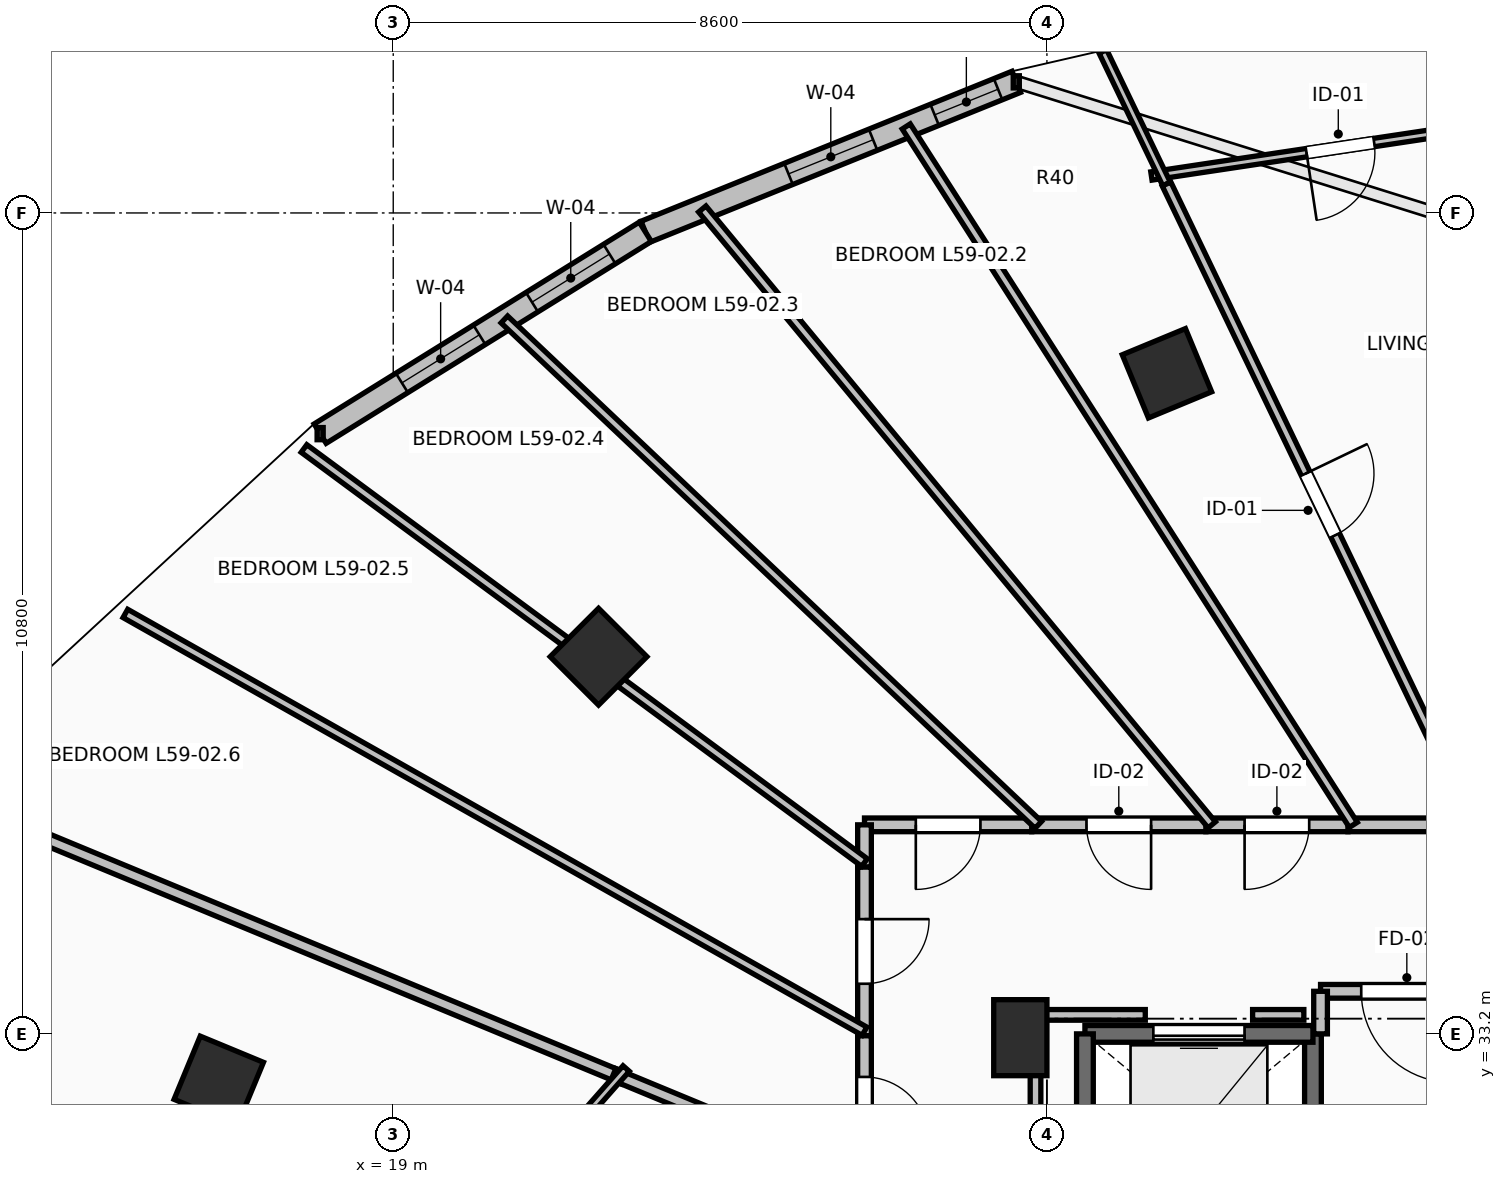
"""IFC4 building model, lengths in metres.
Left out: names, types, materials, properties, quantities, classifications, styles, units other than length and angle.
Written with IfcOpenShell. Run it as: python <this file> out.ifc"""

import sys

from ifc_helpers import new_model, si_unit, direction, frame, frame_2d, origin, origin_2d, place, context, subcontext, project, spatial, rectangle, extrude, element, fill, save


model = new_model("IFC4")
c1 = context("Model", 3, precision=1e-05, world=origin(), true_north=direction((0.0, 1.0)))
c2 = subcontext(c1, "Body", "Model", "MODEL_VIEW")
j1 = project(units=[si_unit("LENGTHUNIT", "METRE"), si_unit("PLANEANGLEUNIT", "RADIAN")], contexts=[c1])
p1 = place(None, origin())
s1 = spatial("IfcSite", under=j1, at=p1, CompositionType="ELEMENT")
p2 = place(p1, origin())
s2 = spatial("IfcBuilding", under=s1, at=p2, CompositionType="ELEMENT")
p3 = place(p2, frame((0.0, 0.0, 217.85)))
s3 = spatial("IfcBuildingStorey", under=s2, at=p3, CompositionType="ELEMENT", Elevation=217.85)
for number, where, z_axis, x_axis in (
    (1, (29.179, 41.891, 0.0), (0.0, 0.0, 1.0), (-0.383, 0.924, 0.0)),
    (2, (21.701, 38.162, 0.0), (0.0, 0.0, 1.0), (-0.707, 0.707, 0.0)),
    (3, (16.705, 32.582, 0.0), (0.0, 0.0, 1.0), (-0.924, 0.383, 0.0)),
):
    element("IfcColumn", number, at=place(p3, frame(where, z_axis=z_axis, x_axis=x_axis)), inside=s3, PredefinedType="COLUMN", context=c2, shape_type="SweptSolid", body=[
        extrude(rectangle(XDim=0.9, YDim=0.9, at=origin_2d()), origin(), (0.0, 0.0, 1.0), 3.55),
    ])
p4 = place(p3, frame((27.25, 33.15, 0.0), z_axis=(0.0, 0.0, 1.0), x_axis=(1.0, 0.0, 0.0)))
e4 = element("IfcColumn", 4, at=p4, inside=s3, PredefinedType="PILASTER", context=c2, shape_type="SweptSolid", body=[
    extrude(rectangle(XDim=0.7, YDim=1.0, at=origin_2d()), origin(), (0.0, 0.0, 1.0), 3.55),
])
p5 = place(p3, frame((27.197, 45.725, 0.0), z_axis=(0.0, 0.0, 1.0), x_axis=(-0.927111094334, -0.374786630981, 0.0)))
e5 = element("IfcWall", 5, at=p5, inside=s3, PredefinedType="STANDARD", context=c2, shape_type="SweptSolid", body=[
    extrude(rectangle(XDim=5.264, YDim=0.3, at=frame_2d((2.632, 0.0))), origin(), (0.0, 0.0, 1.0), 3.29),
])
p6 = place(p5, frame((0.258, 0.0, 0.85)))
e6 = element("IfcOpeningElement", 6, at=p6, cuts=e5, PredefinedType="OPENING", context=c2, shape_type="SweptSolid", body=[
    extrude(rectangle(XDim=0.9, YDim=1.8, at=frame_2d((0.45, 0.9))), frame((0.0, 0.165, 0.0), z_axis=(0.0, -1.0, 0.0), x_axis=(1.0, 0.0, 0.0)), (0.0, 0.0, 1.0), 0.33),
])
p7 = place(p5, frame((2.032, 0.0, 0.85)))
e7 = element("IfcOpeningElement", 7, at=p7, cuts=e5, PredefinedType="OPENING", context=c2, shape_type="SweptSolid", body=[
    extrude(rectangle(XDim=1.2, YDim=1.95, at=frame_2d((0.6, 0.975))), frame((0.0, 0.165, 0.0), z_axis=(0.0, -1.0, 0.0), x_axis=(1.0, 0.0, 0.0)), (0.0, 0.0, 1.0), 0.33),
])
p8 = place(p3, frame((22.316, 43.752, 0.0), z_axis=(0.0, 0.0, 1.0), x_axis=(-0.849647657754, -0.527350791858, 0.0)))
e8 = element("IfcWall", 8, at=p8, inside=s3, PredefinedType="STANDARD", context=c2, shape_type="SweptSolid", body=[
    extrude(rectangle(XDim=5.035, YDim=0.3, at=frame_2d((2.518, 0.0))), origin(), (0.0, 0.0, 1.0), 3.29),
])
p9 = place(p8, frame((0.555, 0.0, 0.85)))
e9 = element("IfcOpeningElement", 9, at=p9, cuts=e8, PredefinedType="OPENING", context=c2, shape_type="SweptSolid", body=[
    extrude(rectangle(XDim=1.2, YDim=1.95, at=frame_2d((0.6, 0.975))), frame((0.0, 0.165, 0.0), z_axis=(0.0, -1.0, 0.0), x_axis=(1.0, 0.0, 0.0)), (0.0, 0.0, 1.0), 0.33),
])
p10 = place(p8, frame((2.569, 0.0, 0.85)))
e10 = element("IfcOpeningElement", 10, at=p10, cuts=e8, PredefinedType="OPENING", context=c2, shape_type="SweptSolid", body=[
    extrude(rectangle(XDim=1.2, YDim=1.95, at=frame_2d((0.6, 0.975))), frame((0.0, 0.165, 0.0), z_axis=(0.0, -1.0, 0.0), x_axis=(1.0, 0.0, 0.0)), (0.0, 0.0, 1.0), 0.33),
])
p11 = place(p3, frame((31.1, 30.7, 0.0), z_axis=(0.0, 0.0, 1.0), x_axis=(0.0, 1.0, 0.0)))
e11 = element("IfcWall", 11, at=p11, inside=s3, PredefinedType="SOLIDWALL", context=c2, shape_type="SweptSolid", body=[
    extrude(rectangle(XDim=2.5, YDim=0.22, at=frame_2d((1.25, 0.0))), origin(), (0.0, 0.0, 1.0), 3.29),
])
p12 = place(p3, frame((31.1, 33.2, 0.0), z_axis=(0.0, 0.0, 1.0), x_axis=(-1.0, 0.0, 0.0)))
e12 = element("IfcWall", 12, at=p12, inside=s3, PredefinedType="SOLIDWALL", context=c2, shape_type="SweptSolid", body=[
    extrude(rectangle(XDim=3.0, YDim=0.22, at=frame_2d((1.5, 0.0))), origin(), (0.0, 0.0, 1.0), 3.29),
])
p13 = place(p12, frame((0.9, 0.0, 0.0)))
e13 = element("IfcOpeningElement", 13, at=p13, cuts=e12, PredefinedType="OPENING", context=c2, shape_type="SweptSolid", body=[
    extrude(rectangle(XDim=1.2, YDim=2.2, at=frame_2d((0.6, 1.1))), frame((0.0, 0.125, 0.0), z_axis=(0.0, -1.0, 0.0), x_axis=(1.0, 0.0, 0.0)), (0.0, 0.0, 1.0), 0.25),
])
p14 = place(p3, frame((28.1, 33.2, 0.0), z_axis=(0.0, 0.0, 1.0), x_axis=(0.0, -1.0, 0.0)))
e14 = element("IfcWall", 14, at=p14, inside=s3, PredefinedType="SOLIDWALL", context=c2, shape_type="SweptSolid", body=[
    extrude(rectangle(XDim=2.5, YDim=0.22, at=frame_2d((1.25, 0.0))), origin(), (0.0, 0.0, 1.0), 3.29),
])
p15 = place(p3, frame((33.47, 33.76, 0.0), z_axis=(0.0, 0.0, 1.0), x_axis=(-1.0, 0.0, 0.0)))
e15 = element("IfcWall", 15, at=p15, inside=s3, PredefinedType="PARTITIONING", context=c2, shape_type="SweptSolid", body=[
    extrude(rectangle(XDim=2.27, YDim=0.18, at=frame_2d((1.135, 0.0))), origin(), (0.0, 0.0, 1.0), 3.29),
])
p16 = place(p15, frame((0.535, 0.0, 0.0)))
e16 = element("IfcOpeningElement", 16, at=p16, cuts=e15, PredefinedType="OPENING", context=c2, shape_type="SweptSolid", body=[
    extrude(rectangle(XDim=1.2, YDim=2.15, at=frame_2d((0.6, 1.075))), frame((0.0, 0.105, 0.0), z_axis=(0.0, -1.0, 0.0), x_axis=(1.0, 0.0, 0.0)), (0.0, 0.0, 1.0), 0.21),
])
p17 = place(p3, frame((31.2, 33.76, 0.0), z_axis=(0.0, 0.0, 1.0), x_axis=(0.0, -1.0, 0.0)))
e17 = element("IfcWall", 17, at=p17, inside=s3, PredefinedType="PARTITIONING", context=c2, shape_type="SweptSolid", body=[
    extrude(rectangle(XDim=0.56, YDim=0.18, at=frame_2d((0.28, 0.0))), origin(), (0.0, 0.0, 1.0), 3.29),
])
p18 = place(p3, frame((33.155, 35.95, 0.0), z_axis=(0.0, 0.0, 1.0), x_axis=(-1.0, 0.0, 0.0)))
e18 = element("IfcWall", 18, at=p18, inside=s3, PredefinedType="PARTITIONING", context=c2, shape_type="SweptSolid", body=[
    extrude(rectangle(XDim=1.595, YDim=0.18, at=frame_2d((0.797, 0.0))), origin(), (0.0, 0.0, 1.0), 3.29),
])
p19 = place(p3, frame((31.56, 35.95, 0.0), z_axis=(0.0, 0.0, 1.0), x_axis=(-1.0, 0.0, 0.0)))
e19 = element("IfcWall", 19, at=p19, inside=s3, PredefinedType="PARTITIONING", context=c2, shape_type="SweptSolid", body=[
    extrude(rectangle(XDim=1.869, YDim=0.18, at=frame_2d((0.935, 0.0))), origin(), (0.0, 0.0, 1.0), 2.482),
])
p20 = place(p19, frame((0.51, 0.0, 0.0)))
e20 = element("IfcOpeningElement", 20, at=p20, cuts=e19, PredefinedType="OPENING", context=c2, shape_type="SweptSolid", body=[
    extrude(rectangle(XDim=0.85, YDim=2.1, at=frame_2d((0.425, 1.05))), frame((0.0, 0.105, 0.0), z_axis=(0.0, -1.0, 0.0), x_axis=(1.0, 0.0, 0.0)), (0.0, 0.0, 1.0), 0.21),
])
p21 = place(p3, frame((29.691, 35.95, 0.0), z_axis=(0.0, 0.0, 1.0), x_axis=(-1.0, 0.0, 0.0)))
e21 = element("IfcWall", 21, at=p21, inside=s3, PredefinedType="PARTITIONING", context=c2, shape_type="SweptSolid", body=[
    extrude(rectangle(XDim=2.291, YDim=0.18, at=frame_2d((1.146, 0.0))), origin(), (0.0, 0.0, 1.0), 2.482),
])
p22 = place(p21, frame((0.72, 0.0, 0.0)))
e22 = element("IfcOpeningElement", 22, at=p22, cuts=e21, PredefinedType="OPENING", context=c2, shape_type="SweptSolid", body=[
    extrude(rectangle(XDim=0.85, YDim=2.1, at=frame_2d((0.425, 1.05))), frame((0.0, 0.105, 0.0), z_axis=(0.0, -1.0, 0.0), x_axis=(1.0, 0.0, 0.0)), (0.0, 0.0, 1.0), 0.21),
])
p23 = place(p3, frame((27.4, 35.95, 0.0), z_axis=(0.0, 0.0, 1.0), x_axis=(-1.0, 0.0, 0.0)))
e23 = element("IfcWall", 23, at=p23, inside=s3, PredefinedType="PARTITIONING", context=c2, shape_type="SweptSolid", body=[
    extrude(rectangle(XDim=2.2, YDim=0.18, at=frame_2d((1.1, 0.0))), origin(), (0.0, 0.0, 1.0), 2.924),
])
p24 = place(p23, frame((0.675, 0.0, 0.0)))
e24 = element("IfcOpeningElement", 24, at=p24, cuts=e23, PredefinedType="OPENING", context=c2, shape_type="SweptSolid", body=[
    extrude(rectangle(XDim=0.85, YDim=2.1, at=frame_2d((0.425, 1.05))), frame((0.0, 0.105, 0.0), z_axis=(0.0, -1.0, 0.0), x_axis=(1.0, 0.0, 0.0)), (0.0, 0.0, 1.0), 0.21),
])
p25 = place(p3, frame((25.2, 35.95, 0.0), z_axis=(0.0, 0.0, 1.0), x_axis=(0.0, -1.0, 0.0)))
e25 = element("IfcWall", 25, at=p25, inside=s3, PredefinedType="PARTITIONING", context=c2, shape_type="SweptSolid", body=[
    extrude(rectangle(XDim=0.556, YDim=0.18, at=frame_2d((0.278, 0.0))), origin(), (0.0, 0.0, 1.0), 3.29),
])
p26 = place(p3, frame((25.2, 35.394, 0.0), z_axis=(0.0, 0.0, 1.0), x_axis=(0.0, -1.0, 0.0)))
e26 = element("IfcWall", 26, at=p26, inside=s3, PredefinedType="PARTITIONING", context=c2, shape_type="SweptSolid", body=[
    extrude(rectangle(XDim=2.219, YDim=0.18, at=frame_2d((1.109, 0.0))), origin(), (0.0, 0.0, 1.0), 2.482),
])
p27 = place(p26, frame((0.685, 0.0, 0.0)))
e27 = element("IfcOpeningElement", 27, at=p27, cuts=e26, PredefinedType="OPENING", context=c2, shape_type="SweptSolid", body=[
    extrude(rectangle(XDim=0.85, YDim=2.1, at=frame_2d((0.425, 1.05))), frame((0.0, 0.105, 0.0), z_axis=(0.0, -1.0, 0.0), x_axis=(1.0, 0.0, 0.0)), (0.0, 0.0, 1.0), 0.21),
])
p28 = place(p3, frame((25.2, 33.175, 0.0), z_axis=(0.0, 0.0, 1.0), x_axis=(0.0, -1.0, 0.0)))
e28 = element("IfcWall", 28, at=p28, inside=s3, PredefinedType="PARTITIONING", context=c2, shape_type="SweptSolid", body=[
    extrude(rectangle(XDim=1.933, YDim=0.18, at=frame_2d((0.967, 0.0))), origin(), (0.0, 0.0, 1.0), 3.29),
])
p29 = place(p28, frame((0.542, 0.0, 0.0)))
e29 = element("IfcOpeningElement", 29, at=p29, cuts=e28, PredefinedType="OPENING", context=c2, shape_type="SweptSolid", body=[
    extrude(rectangle(XDim=0.85, YDim=2.1, at=frame_2d((0.425, 1.05))), frame((0.0, 0.105, 0.0), z_axis=(0.0, -1.0, 0.0), x_axis=(1.0, 0.0, 0.0)), (0.0, 0.0, 1.0), 0.21),
])
p30 = place(p3, frame((33.945, 45.234, 0.0), z_axis=(0.0, 0.0, 1.0), x_axis=(-0.988872134662, -0.148767944424, 0.0)))
e30 = element("IfcWall", 30, at=p30, inside=s3, PredefinedType="PARTITIONING", context=c2, shape_type="SweptSolid", body=[
    extrude(rectangle(XDim=5.027, YDim=0.11, at=frame_2d((2.513, 0.0))), origin(), (0.0, 0.0, 1.0), 3.29),
])
p31 = place(p30, frame((2.063, 0.0, 0.0)))
e31 = element("IfcOpeningElement", 31, at=p31, cuts=e30, PredefinedType="OPENING", context=c2, shape_type="SweptSolid", body=[
    extrude(rectangle(XDim=0.9, YDim=2.1, at=frame_2d((0.45, 1.05))), frame((0.0, 0.07, 0.0), z_axis=(0.0, -1.0, 0.0), x_axis=(1.0, 0.0, 0.0)), (0.0, 0.0, 1.0), 0.14),
])
p32 = place(p3, frame((29.174, 44.381, 0.0), z_axis=(0.0, 0.0, 1.0), x_axis=(-0.432866492457, 0.901458041014, 0.0)))
e32 = element("IfcWall", 32, at=p32, inside=s3, PredefinedType="PARTITIONING", context=c2, shape_type="SweptSolid", body=[
    extrude(rectangle(XDim=1.934, YDim=0.11, at=frame_2d((0.967, 0.0))), origin(), (0.0, 0.0, 1.0), 3.29),
])
p33 = place(p3, frame((29.174, 44.381, 0.0), z_axis=(0.0, 0.0, 1.0), x_axis=(0.432861754343, -0.901460316169, 0.0)))
e33 = element("IfcWall", 33, at=p33, inside=s3, PredefinedType="PARTITIONING", context=c2, shape_type="SweptSolid", body=[
    extrude(rectangle(XDim=9.353, YDim=0.125, at=frame_2d((4.676, 0.0))), origin(), (0.0, 0.0, 1.0), 2.482),
])
p34 = place(p33, frame((4.226, 0.0, 0.0)))
e34 = element("IfcOpeningElement", 34, at=p34, cuts=e33, PredefinedType="OPENING", context=c2, shape_type="SweptSolid", body=[
    extrude(rectangle(XDim=0.9, YDim=2.1, at=frame_2d((0.45, 1.05))), frame((0.0, 0.077, 0.0), z_axis=(0.0, -1.0, 0.0), x_axis=(1.0, 0.0, 0.0)), (0.0, 0.0, 1.0), 0.155),
])
p35 = place(p3, frame((25.749, 45.138, 0.0), z_axis=(0.0, 0.0, 1.0), x_axis=(0.539168632786, -0.842197830335, 0.0)))
e35 = element("IfcWall", 35, at=p35, inside=s3, PredefinedType="PARTITIONING", context=c2, shape_type="SweptSolid", body=[
    extrude(rectangle(XDim=10.909, YDim=0.125, at=frame_2d((5.455, 0.0))), origin(), (0.0, 0.0, 1.0), 2.482),
])
p36 = place(p3, frame((23.066, 44.052, 0.0), z_axis=(0.0, 0.0, 1.0), x_axis=(0.637453668746, -0.770488689211, 0.0)))
e36 = element("IfcWall", 36, at=p36, inside=s3, PredefinedType="PARTITIONING", context=c2, shape_type="SweptSolid", body=[
    extrude(rectangle(XDim=10.515, YDim=0.125, at=frame_2d((5.258, 0.0))), origin(), (0.0, 0.0, 1.0), 2.482),
])
p37 = place(p3, frame((20.462, 42.599, 0.0), z_axis=(0.0, 0.0, 1.0), x_axis=(0.726274273347, -0.687405033349, 0.0)))
e37 = element("IfcWall", 37, at=p37, inside=s3, PredefinedType="PARTITIONING", context=c2, shape_type="SweptSolid", body=[
    extrude(rectangle(XDim=9.673, YDim=0.125, at=frame_2d((4.836, 0.0))), origin(), (0.0, 0.0, 1.0), 2.824),
])
p38 = place(p3, frame((17.826, 40.901, 0.0), z_axis=(0.0, 0.0, 1.0), x_axis=(0.804363169868, -0.594137939338, 0.0)))
e38 = element("IfcWall", 38, at=p38, inside=s3, PredefinedType="PARTITIONING", context=c2, shape_type="SweptSolid", body=[
    extrude(rectangle(XDim=9.167, YDim=0.125, at=frame_2d((4.584, 0.0))), origin(), (0.0, 0.0, 1.0), 2.482),
])
p39 = place(p3, frame((15.476, 38.731, 0.0), z_axis=(0.0, 0.0, 1.0), x_axis=(0.870572608778, -0.49203997078, 0.0)))
e39 = element("IfcWall", 39, at=p39, inside=s3, PredefinedType="PARTITIONING", context=c2, shape_type="SweptSolid", body=[
    extrude(rectangle(XDim=11.169, YDim=0.125, at=frame_2d((5.585, 0.0))), origin(), (0.0, 0.0, 1.0), 2.824),
])
p40 = place(p3, frame((13.36, 36.206, 0.0), z_axis=(0.0, 0.0, 1.0), x_axis=(0.923875681471, -0.382692729466, 0.0)))
e40 = element("IfcWall", 40, at=p40, inside=s3, PredefinedType="PARTITIONING", context=c2, shape_type="SweptSolid", body=[
    extrude(rectangle(XDim=9.381, YDim=0.16, at=frame_2d((4.69, 0.0))), origin(), (0.0, 0.0, 1.0), 2.824),
])
p41 = place(p3, frame((21.898, 32.67, 0.0), z_axis=(0.0, 0.0, 1.0), x_axis=(0.923953480513, -0.382504857286, 0.0)))
e41 = element("IfcWall", 41, at=p41, inside=s3, PredefinedType="PARTITIONING", context=c2, shape_type="SweptSolid", body=[
    extrude(rectangle(XDim=2.958, YDim=0.16, at=frame_2d((1.479, 0.0))), origin(), (0.0, 0.0, 1.0), 2.924),
])
p42 = place(p3, frame((20.76, 31.266, 0.0), z_axis=(0.0, 0.0, 1.0), x_axis=(0.661699472354, 0.749769170003, 0.0)))
e42 = element("IfcWall", 42, at=p42, inside=s3, PredefinedType="PARTITIONING", context=c2, shape_type="SweptSolid", body=[
    extrude(rectangle(XDim=1.971, YDim=0.11, at=frame_2d((0.985, 0.0))), origin(), (0.0, 0.0, 1.0), 3.29),
])
p43 = place(p3, frame((30.98, 33.45, 0.0), z_axis=(0.0, 0.0, 1.0), x_axis=(-1.0, 0.0, 0.0)))
e43 = element("IfcWall", 43, at=p43, inside=s3, PredefinedType="PARTITIONING", context=c2, shape_type="SweptSolid", body=[
    extrude(rectangle(XDim=0.674, YDim=0.14, at=frame_2d((0.337, 0.0))), origin(), (0.0, 0.0, 1.0), 3.29),
])
p44 = place(p3, frame((28.894, 33.45, 0.0), z_axis=(0.0, 0.0, 1.0), x_axis=(-1.0, 0.0, 0.0)))
e44 = element("IfcWall", 44, at=p44, inside=s3, PredefinedType="PARTITIONING", context=c2, shape_type="SweptSolid", body=[
    extrude(rectangle(XDim=1.444, YDim=0.14, at=frame_2d((0.722, 0.0))), origin(), (0.0, 0.0, 1.0), 2.482),
])
p45 = place(p3, frame((27.45, 33.45, 0.0), z_axis=(0.0, 0.0, 1.0), x_axis=(0.0, -1.0, 0.0)))
e45 = element("IfcWall", 45, at=p45, inside=s3, PredefinedType="PARTITIONING", context=c2, shape_type="SweptSolid", body=[
    extrude(rectangle(XDim=5.254, YDim=0.14, at=frame_2d((2.627, 0.0))), origin(), (0.0, 0.0, 1.0), 2.482),
])
p46 = place(p6, origin())
e46 = element("IfcWindow", 46, at=p46, inside=s3, PartitioningType="SINGLE_PANEL", PredefinedType="WINDOW", context=c2, shape_type="SweptSolid", body=[
    extrude(rectangle(XDim=0.9, YDim=1.8, at=frame_2d((0.45, 0.9))), frame((0.0, 0.03, 0.0), z_axis=(0.0, -1.0, 0.0), x_axis=(1.0, 0.0, 0.0)), (0.0, 0.0, 1.0), 0.06),
])
fill(e6, e46)
p47 = place(p7, origin())
e47 = element("IfcWindow", 47, at=p47, inside=s3, PartitioningType="SINGLE_PANEL", PredefinedType="WINDOW", context=c2, shape_type="SweptSolid", body=[
    extrude(rectangle(XDim=1.2, YDim=1.95, at=frame_2d((0.6, 0.975))), frame((0.0, 0.03, 0.0), z_axis=(0.0, -1.0, 0.0), x_axis=(1.0, 0.0, 0.0)), (0.0, 0.0, 1.0), 0.06),
])
fill(e7, e47)
p48 = place(p9, origin())
e48 = element("IfcWindow", 48, at=p48, inside=s3, PartitioningType="SINGLE_PANEL", PredefinedType="WINDOW", context=c2, shape_type="SweptSolid", body=[
    extrude(rectangle(XDim=1.2, YDim=1.95, at=frame_2d((0.6, 0.975))), frame((0.0, 0.03, 0.0), z_axis=(0.0, -1.0, 0.0), x_axis=(1.0, 0.0, 0.0)), (0.0, 0.0, 1.0), 0.06),
])
fill(e9, e48)
p49 = place(p10, origin())
e49 = element("IfcWindow", 49, at=p49, inside=s3, PartitioningType="SINGLE_PANEL", PredefinedType="WINDOW", context=c2, shape_type="SweptSolid", body=[
    extrude(rectangle(XDim=1.2, YDim=1.95, at=frame_2d((0.6, 0.975))), frame((0.0, 0.03, 0.0), z_axis=(0.0, -1.0, 0.0), x_axis=(1.0, 0.0, 0.0)), (0.0, 0.0, 1.0), 0.06),
])
fill(e10, e49)
p50 = place(p13, origin())
e50 = element("IfcDoor", 50, at=p50, inside=s3, OperationType="SLIDING_TO_LEFT", PredefinedType="DOOR", context=c2, shape_type="SweptSolid", body=[
    extrude(rectangle(XDim=1.2, YDim=2.2, at=frame_2d((0.6, 1.1))), frame((0.0, 0.025, 0.0), z_axis=(0.0, -1.0, 0.0), x_axis=(1.0, 0.0, 0.0)), (0.0, 0.0, 1.0), 0.05),
])
fill(e13, e50)
p51 = place(p16, origin())
e51 = element("IfcDoor", 51, at=p51, inside=s3, OperationType="SINGLE_SWING_LEFT", PredefinedType="DOOR", context=c2, shape_type="SweptSolid", body=[
    extrude(rectangle(XDim=1.2, YDim=2.15, at=frame_2d((0.6, 1.075))), frame((0.0, 0.025, 0.0), z_axis=(0.0, -1.0, 0.0), x_axis=(1.0, 0.0, 0.0)), (0.0, 0.0, 1.0), 0.05),
])
fill(e16, e51)
p52 = place(p31, origin())
e52 = element("IfcDoor", 52, at=p52, inside=s3, OperationType="SINGLE_SWING_RIGHT", PredefinedType="DOOR", context=c2, shape_type="SweptSolid", body=[
    extrude(rectangle(XDim=0.9, YDim=2.1, at=frame_2d((0.45, 1.05))), frame((0.0, 0.025, 0.0), z_axis=(0.0, -1.0, 0.0), x_axis=(1.0, 0.0, 0.0)), (0.0, 0.0, 1.0), 0.05),
])
fill(e31, e52)
p53 = place(p34, origin())
e53 = element("IfcDoor", 53, at=p53, inside=s3, OperationType="SINGLE_SWING_LEFT", PredefinedType="DOOR", context=c2, shape_type="SweptSolid", body=[
    extrude(rectangle(XDim=0.9, YDim=2.1, at=frame_2d((0.45, 1.05))), frame((0.0, 0.025, 0.0), z_axis=(0.0, -1.0, 0.0), x_axis=(1.0, 0.0, 0.0)), (0.0, 0.0, 1.0), 0.05),
])
fill(e34, e53)
p54 = place(p20, origin())
e54 = element("IfcDoor", 54, at=p54, inside=s3, OperationType="SINGLE_SWING_RIGHT", PredefinedType="DOOR", context=c2, shape_type="SweptSolid", body=[
    extrude(rectangle(XDim=0.85, YDim=2.1, at=frame_2d((0.425, 1.05))), frame((0.0, 0.025, 0.0), z_axis=(0.0, -1.0, 0.0), x_axis=(1.0, 0.0, 0.0)), (0.0, 0.0, 1.0), 0.05),
])
fill(e20, e54)
p55 = place(p22, origin())
e55 = element("IfcDoor", 55, at=p55, inside=s3, OperationType="SINGLE_SWING_LEFT", PredefinedType="DOOR", context=c2, shape_type="SweptSolid", body=[
    extrude(rectangle(XDim=0.85, YDim=2.1, at=frame_2d((0.425, 1.05))), frame((0.0, 0.025, 0.0), z_axis=(0.0, -1.0, 0.0), x_axis=(1.0, 0.0, 0.0)), (0.0, 0.0, 1.0), 0.05),
])
fill(e22, e55)
p56 = place(p24, origin())
e56 = element("IfcDoor", 56, at=p56, inside=s3, OperationType="SINGLE_SWING_RIGHT", PredefinedType="DOOR", context=c2, shape_type="SweptSolid", body=[
    extrude(rectangle(XDim=0.85, YDim=2.1, at=frame_2d((0.425, 1.05))), frame((0.0, 0.025, 0.0), z_axis=(0.0, -1.0, 0.0), x_axis=(1.0, 0.0, 0.0)), (0.0, 0.0, 1.0), 0.05),
])
fill(e24, e56)
p57 = place(p27, origin())
e57 = element("IfcDoor", 57, at=p57, inside=s3, OperationType="SINGLE_SWING_LEFT", PredefinedType="DOOR", context=c2, shape_type="SweptSolid", body=[
    extrude(rectangle(XDim=0.85, YDim=2.1, at=frame_2d((0.425, 1.05))), frame((0.0, 0.025, 0.0), z_axis=(0.0, -1.0, 0.0), x_axis=(1.0, 0.0, 0.0)), (0.0, 0.0, 1.0), 0.05),
])
fill(e27, e57)
p58 = place(p29, origin())
e58 = element("IfcDoor", 58, at=p58, inside=s3, OperationType="SINGLE_SWING_RIGHT", PredefinedType="DOOR", context=c2, shape_type="SweptSolid", body=[
    extrude(rectangle(XDim=0.85, YDim=2.1, at=frame_2d((0.425, 1.05))), frame((0.0, 0.025, 0.0), z_axis=(0.0, -1.0, 0.0), x_axis=(1.0, 0.0, 0.0)), (0.0, 0.0, 1.0), 0.05),
])
fill(e29, e58)
save(model, sys.argv[1])
